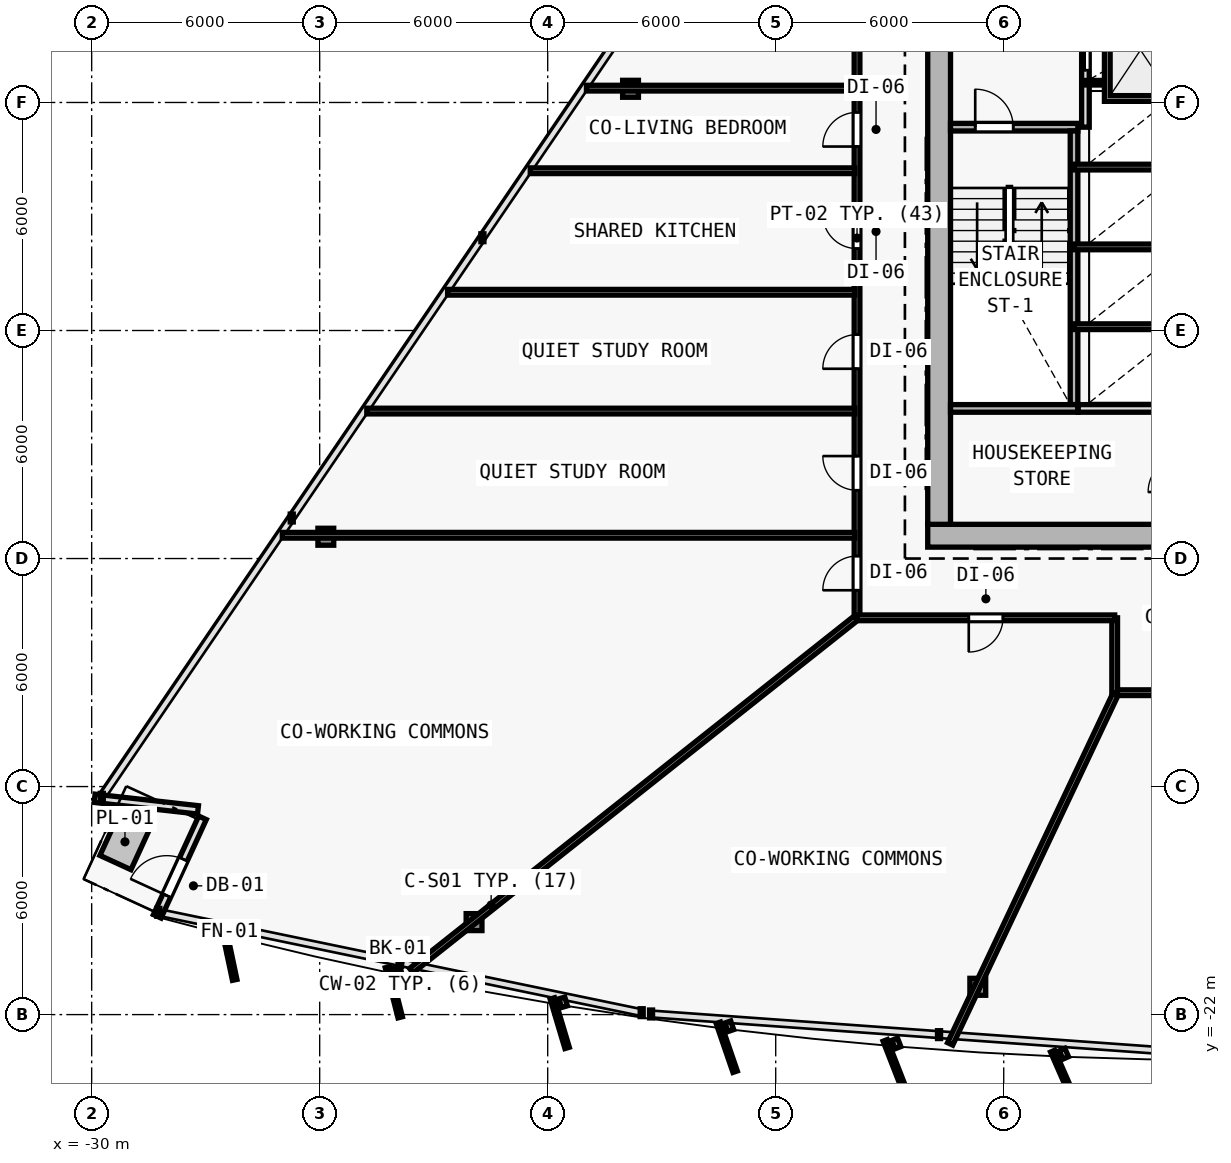
"""IFC4 building model, lengths in metres.
Left out: names, types, materials, properties, quantities, classifications, styles, units other than length and angle.
Written with IfcOpenShell. Run it as: python <this file> out.ifc"""

import sys

from ifc_helpers import new_model, si_unit, direction, frame, frame_2d, origin, origin_2d, place, context, subcontext, project, spatial, rectangle, i_section, extrude, element, fill, save


model = new_model("IFC4")
c1 = context("Model", 3, precision=1e-05, world=origin(), true_north=direction((0.0, 1.0)))
c2 = subcontext(c1, "Body", "Model", "MODEL_VIEW")
j1 = project(units=[si_unit("LENGTHUNIT", "METRE"), si_unit("PLANEANGLEUNIT", "RADIAN")], contexts=[c1])
p1 = place(None, origin())
s1 = spatial("IfcSite", under=j1, at=p1, CompositionType="ELEMENT")
p2 = place(p1, origin())
s2 = spatial("IfcBuilding", under=s1, at=p2, CompositionType="ELEMENT")
p3 = place(p2, frame((0.0, 0.0, 48.0)))
s3 = spatial("IfcBuildingStorey", under=s2, at=p3, CompositionType="ELEMENT", Elevation=48.0)
for number, where, z_axis, x_axis in (
    (1, (-7.7, -9.4, 0.0), (0.0, 0.0, 1.0), (1.0, 0.0, 0.0)),
    (2, (-7.7, 2.0, 0.0), (0.0, 0.0, 1.0), (1.0, 0.0, 0.0)),
):
    element("IfcColumn", number, at=place(p3, frame(where, z_axis=z_axis, x_axis=x_axis)), inside=s3, PredefinedType="COLUMN", context=c2, shape_type="SweptSolid", body=[
        extrude(i_section(OverallWidth=0.416, OverallDepth=0.446, WebThickness=0.025, FlangeThickness=0.04, FilletRadius=0.015, at=origin_2d()), origin(), (0.0, 0.0, 1.0), 3.6),
    ])
p4 = place(p3, frame((-19.938, -19.566, 0.006), z_axis=(0.020596339702, 0.033443561496, 0.99922836178), x_axis=(-0.851480003019, 0.52438707503, 0.0)))
e3 = element("IfcColumn", 3, at=p4, inside=s3, PredefinedType="COLUMN", context=c2, shape_type="SweptSolid", body=[
    extrude(i_section(OverallWidth=0.416, OverallDepth=0.446, WebThickness=0.025, FlangeThickness=0.04, FilletRadius=0.015, at=origin_2d()), origin(), (0.0, 0.0, 1.0), 3.592),
])
p5 = place(p3, frame((-6.682, -21.268, 0.006), z_axis=(0.006866324617, 0.035215407439, 0.999356157066), x_axis=(-0.981516643497, 0.191376797284, 0.0)))
e4 = element("IfcColumn", 4, at=p5, inside=s3, PredefinedType="COLUMN", context=c2, shape_type="SweptSolid", body=[
    extrude(i_section(OverallWidth=0.416, OverallDepth=0.446, WebThickness=0.025, FlangeThickness=0.04, FilletRadius=0.015, at=origin_2d()), origin(), (0.0, 0.0, 1.0), 3.591),
])
p6 = place(p3, frame((-15.82, 2.36, 0.006), z_axis=(0.017071567417, 0.009521989794, 0.999808928394), x_axis=(-0.487119351792, 0.873335409284, 0.0)))
e5 = element("IfcColumn", 5, at=p6, inside=s3, PredefinedType="COLUMN", context=c2, shape_type="SweptSolid", body=[
    extrude(i_section(OverallWidth=0.416, OverallDepth=0.446, WebThickness=0.025, FlangeThickness=0.04, FilletRadius=0.015, at=origin_2d()), origin(), (0.0, 0.0, 1.0), 3.59),
])
p7 = place(p3, frame((-23.838, -9.427, 0.006), z_axis=(0.025224163578, 0.021620711639, 0.999447990843), x_axis=(-0.650791373456, 0.759256602365, 0.0)))
e6 = element("IfcColumn", 6, at=p7, inside=s3, PredefinedType="COLUMN", context=c2, shape_type="SweptSolid", body=[
    extrude(i_section(OverallWidth=0.416, OverallDepth=0.446, WebThickness=0.025, FlangeThickness=0.04, FilletRadius=0.015, at=origin_2d()), origin(), (0.0, 0.0, 1.0), 3.591),
])
p8 = place(p3, frame((-27.202, -16.612, 0.0), z_axis=(0.0, 0.0, 1.0), x_axis=(-0.993822658088, 0.110979837223, 0.0)))
e7 = element("IfcWall", 7, at=p8, inside=s3, PredefinedType="SOLIDWALL", context=c2, shape_type="SweptSolid", body=[
    extrude(rectangle(XDim=2.737, YDim=0.22, at=frame_2d((1.368, 0.0))), origin(), (0.0, 0.0, 1.0), 3.35),
])
p9 = place(p3, frame((-28.274, -19.414, 0.0), z_axis=(0.0, 0.0, 1.0), x_axis=(0.417521186742, 0.908667188041, 0.0)))
e8 = element("IfcWall", 8, at=p9, inside=s3, PredefinedType="SOLIDWALL", context=c2, shape_type="SweptSolid", body=[
    extrude(rectangle(XDim=2.852, YDim=0.22, at=frame_2d((1.426, 0.0))), origin(), (0.0, 0.0, 1.0), 3.35),
])
p10 = place(p9, frame((0.601, 0.0, 0.0)))
e9 = element("IfcOpeningElement", 9, at=p10, cuts=e8, PredefinedType="OPENING", context=c2, shape_type="SweptSolid", body=[
    extrude(rectangle(XDim=1.05, YDim=2.15, at=frame_2d((0.525, 1.075))), frame((0.0, 0.12, 0.0), z_axis=(0.0, -1.0, 0.0), x_axis=(1.0, 0.0, 0.0)), (0.0, 0.0, 1.0), 0.24),
])
p11 = place(p3, frame((-8.0, -9.4, 0.0), z_axis=(0.0, 0.0, 1.0), x_axis=(1.0, 0.0, 0.0)))
e10 = element("IfcWall", 10, at=p11, inside=s3, PredefinedType="SHEAR", context=c2, shape_type="SweptSolid", body=[
    extrude(rectangle(XDim=16.0, YDim=0.6, at=frame_2d((8.0, 0.0))), origin(), (0.0, 0.0, 1.0), 3.35),
])
p12 = place(p11, frame((9.65, 0.0, 0.0)))
e11 = element("IfcOpeningElement", 11, at=p12, cuts=e10, PredefinedType="OPENING", context=c2, shape_type="SweptSolid", body=[
    extrude(rectangle(XDim=1.5, YDim=2.2, at=frame_2d((0.75, 1.1))), frame((0.0, 0.31, 0.0), z_axis=(0.0, -1.0, 0.0), x_axis=(1.0, 0.0, 0.0)), (0.0, 0.0, 1.0), 0.62),
])
p13 = place(p3, frame((-7.7, -9.1, 0.0), z_axis=(0.0, 0.0, 1.0), x_axis=(0.0, 1.0, 0.0)))
e12 = element("IfcWall", 12, at=p13, inside=s3, PredefinedType="SHEAR", context=c2, shape_type="SweptSolid", body=[
    extrude(rectangle(XDim=19.0, YDim=0.6, at=frame_2d((9.5, 0.0))), origin(), (0.0, 0.0, 1.0), 3.35),
])
p14 = place(p13, frame((12.65, 0.0, 0.0)))
e13 = element("IfcOpeningElement", 13, at=p14, cuts=e12, PredefinedType="OPENING", context=c2, shape_type="SweptSolid", body=[
    extrude(rectangle(XDim=1.1, YDim=2.15, at=frame_2d((0.55, 1.075))), frame((0.0, 0.31, 0.0), z_axis=(0.0, -1.0, 0.0), x_axis=(1.0, 0.0, 0.0)), (0.0, 0.0, 1.0), 0.62),
])
p15 = place(p3, frame((-7.4, 1.35, 0.0), z_axis=(0.0, 0.0, 1.0), x_axis=(1.0, 0.0, 0.0)))
e14 = element("IfcWall", 14, at=p15, inside=s3, PredefinedType="SOLIDWALL", context=c2, shape_type="SweptSolid", body=[
    extrude(rectangle(XDim=3.35, YDim=0.2, at=frame_2d((1.675, 0.0))), origin(), (0.0, 0.0, 1.0), 3.35),
])
p16 = place(p15, frame((0.65, 0.0, 0.0)))
e15 = element("IfcOpeningElement", 15, at=p16, cuts=e14, PredefinedType="OPENING", context=c2, shape_type="SweptSolid", body=[
    extrude(rectangle(XDim=1.0, YDim=2.15, at=frame_2d((0.5, 1.075))), frame((0.0, 0.11, 0.0), z_axis=(0.0, -1.0, 0.0), x_axis=(1.0, 0.0, 0.0)), (0.0, 0.0, 1.0), 0.22),
])
p17 = place(p3, frame((-4.15, -5.95, 0.0), z_axis=(0.0, 0.0, 1.0), x_axis=(0.0, 1.0, 0.0)))
e16 = element("IfcWall", 16, at=p17, inside=s3, PredefinedType="SOLIDWALL", context=c2, shape_type="SweptSolid", body=[
    extrude(rectangle(XDim=7.2, YDim=0.2, at=frame_2d((3.6, 0.0))), origin(), (0.0, 0.0, 1.0), 3.35),
])
p18 = place(p3, frame((-3.85, 1.35, 0.0), z_axis=(0.0, 0.0, 1.0), x_axis=(0.0, 1.0, 0.0)))
e17 = element("IfcWall", 17, at=p18, inside=s3, PredefinedType="SOLIDWALL", context=c2, shape_type="SweptSolid", body=[
    extrude(rectangle(XDim=8.545, YDim=0.2, at=frame_2d((4.272, 0.0))), origin(), (0.0, 0.0, 1.0), 3.35),
])
p19 = place(p18, frame((1.5, 0.0, 0.0)))
e18 = element("IfcOpeningElement", 18, at=p19, cuts=e17, PredefinedType="OPENING", context=c2, shape_type="SweptSolid", body=[
    extrude(rectangle(XDim=1.0, YDim=2.15, at=frame_2d((0.5, 1.075))), frame((0.0, 0.11, 0.0), z_axis=(0.0, -1.0, 0.0), x_axis=(1.0, 0.0, 0.0)), (0.0, 0.0, 1.0), 0.22),
])
p20 = place(p18, frame((3.18, 0.0, 0.0)))
e19 = element("IfcOpeningElement", 19, at=p20, cuts=e17, PredefinedType="OPENING", context=c2, shape_type="SweptSolid", body=[
    extrude(rectangle(XDim=1.0, YDim=2.15, at=frame_2d((0.5, 1.075))), frame((0.0, 0.11, 0.0), z_axis=(0.0, -1.0, 0.0), x_axis=(1.0, 0.0, 0.0)), (0.0, 0.0, 1.0), 0.22),
])
p21 = place(p3, frame((-3.85, 2.52, 0.0), z_axis=(0.0, 0.0, 1.0), x_axis=(1.0, 0.0, 0.0)))
e20 = element("IfcWall", 20, at=p21, inside=s3, PredefinedType="PARTITIONING", context=c2, shape_type="SweptSolid", body=[
    extrude(rectangle(XDim=2.9, YDim=0.12, at=frame_2d((1.45, 0.0))), origin(), (0.0, 0.0, 1.0), 3.35),
])
for number, where, z_axis, x_axis in (
    (21, (-4.15, -3.9, 0.0), (0.0, 0.0, 1.0), (1.0, 0.0, 0.0)),
    (22, (-4.15, -1.8, 0.0), (0.0, 0.0, 1.0), (1.0, 0.0, 0.0)),
    (23, (-4.15, 0.3, 0.0), (0.0, 0.0, 1.0), (1.0, 0.0, 0.0)),
):
    element("IfcWall", number, at=place(p3, frame(where, z_axis=z_axis, x_axis=x_axis)), inside=s3, PredefinedType="PARTITIONING", context=c2, shape_type="SweptSolid", body=[
        extrude(rectangle(XDim=2.9, YDim=0.15, at=frame_2d((1.45, 0.0))), origin(), (0.0, 0.0, 1.0), 3.35),
    ])
p22 = place(p3, frame((-7.4, -6.05, 0.0), z_axis=(0.0, 0.0, 1.0), x_axis=(1.0, 0.0, 0.0)))
e24 = element("IfcWall", 24, at=p22, inside=s3, PredefinedType="SOLIDWALL", context=c2, shape_type="SweptSolid", body=[
    extrude(rectangle(XDim=3.35, YDim=0.2, at=frame_2d((1.675, 0.0))), origin(), (0.0, 0.0, 1.0), 3.35),
])
p23 = place(p3, frame((-4.04, -6.05, 0.0), z_axis=(0.0, 0.0, 1.0), x_axis=(1.0, 0.0, 0.0)))
e25 = element("IfcWall", 25, at=p23, inside=s3, PredefinedType="SOLIDWALL", context=c2, shape_type="SweptSolid", body=[
    extrude(rectangle(XDim=2.79, YDim=0.2, at=frame_2d((1.395, 0.0))), origin(), (0.0, 0.0, 1.0), 3.35),
])
p24 = place(p3, frame((-9.86, -11.56, 0.0), z_axis=(0.0, 0.0, 1.0), x_axis=(0.0, 1.0, 0.0)))
e26 = element("IfcWall", 26, at=p24, inside=s3, PredefinedType="PARTITIONING", context=c2, shape_type="SweptSolid", body=[
    extrude(rectangle(XDim=19.986, YDim=0.15, at=frame_2d((9.993, 0.0))), origin(), (0.0, 0.0, 1.0), 2.609),
])
p25 = place(p24, frame((9.715, 0.0, 0.0)))
e27 = element("IfcOpeningElement", 27, at=p25, cuts=e26, PredefinedType="OPENING", context=c2, shape_type="SweptSolid", body=[
    extrude(rectangle(XDim=0.9, YDim=2.1, at=frame_2d((0.45, 1.05))), frame((0.0, 0.085, 0.0), z_axis=(0.0, -1.0, 0.0), x_axis=(1.0, 0.0, 0.0)), (0.0, 0.0, 1.0), 0.17),
])
p26 = place(p24, frame((6.553, 0.0, 0.0)))
e28 = element("IfcOpeningElement", 28, at=p26, cuts=e26, PredefinedType="OPENING", context=c2, shape_type="SweptSolid", body=[
    extrude(rectangle(XDim=0.9, YDim=2.1, at=frame_2d((0.45, 1.05))), frame((0.0, 0.085, 0.0), z_axis=(0.0, -1.0, 0.0), x_axis=(1.0, 0.0, 0.0)), (0.0, 0.0, 1.0), 0.17),
])
p27 = place(p24, frame((3.356, 0.0, 0.0)))
e29 = element("IfcOpeningElement", 29, at=p27, cuts=e26, PredefinedType="OPENING", context=c2, shape_type="SweptSolid", body=[
    extrude(rectangle(XDim=0.9, YDim=2.1, at=frame_2d((0.45, 1.05))), frame((0.0, 0.085, 0.0), z_axis=(0.0, -1.0, 0.0), x_axis=(1.0, 0.0, 0.0)), (0.0, 0.0, 1.0), 0.17),
])
p28 = place(p24, frame((0.725, 0.0, 0.0)))
e30 = element("IfcOpeningElement", 30, at=p28, cuts=e26, PredefinedType="OPENING", context=c2, shape_type="SweptSolid", body=[
    extrude(rectangle(XDim=0.9, YDim=2.1, at=frame_2d((0.45, 1.05))), frame((0.0, 0.085, 0.0), z_axis=(0.0, -1.0, 0.0), x_axis=(1.0, 0.0, 0.0)), (0.0, 0.0, 1.0), 0.17),
])
p29 = place(p24, frame((12.4, 0.0, 0.0)))
e31 = element("IfcOpeningElement", 31, at=p29, cuts=e26, PredefinedType="OPENING", context=c2, shape_type="SweptSolid", body=[
    extrude(rectangle(XDim=0.9, YDim=2.1, at=frame_2d((0.45, 1.05))), frame((0.0, 0.085, 0.0), z_axis=(0.0, -1.0, 0.0), x_axis=(1.0, 0.0, 0.0)), (0.0, 0.0, 1.0), 0.17),
])
p30 = place(p3, frame((3.08, -13.53, 0.0), z_axis=(0.0, 0.0, 1.0), x_axis=(-1.0, 0.0, 0.0)))
e32 = element("IfcWall", 32, at=p30, inside=s3, PredefinedType="PARTITIONING", context=c2, shape_type="SweptSolid", body=[
    extrude(rectangle(XDim=6.16, YDim=0.15, at=frame_2d((3.08, 0.0))), origin(), (0.0, 0.0, 1.0), 2.725),
])
p31 = place(p3, frame((-3.08, -13.53, 0.0), z_axis=(0.0, 0.0, 1.0), x_axis=(0.0, 1.0, 0.0)))
e33 = element("IfcWall", 33, at=p31, inside=s3, PredefinedType="PARTITIONING", context=c2, shape_type="SweptSolid", body=[
    extrude(rectangle(XDim=1.97, YDim=0.15, at=frame_2d((0.985, 0.0))), origin(), (0.0, 0.0, 1.0), 2.965),
])
p32 = place(p3, frame((-3.08, -11.56, 0.0), z_axis=(0.0, 0.0, 1.0), x_axis=(-1.0, 0.0, 0.0)))
e34 = element("IfcWall", 34, at=p32, inside=s3, PredefinedType="PARTITIONING", context=c2, shape_type="SweptSolid", body=[
    extrude(rectangle(XDim=6.78, YDim=0.15, at=frame_2d((3.39, 0.0))), origin(), (0.0, 0.0, 1.0), 2.725),
])
p33 = place(p32, frame((2.94, 0.0, 0.0)))
e35 = element("IfcOpeningElement", 35, at=p33, cuts=e34, PredefinedType="OPENING", context=c2, shape_type="SweptSolid", body=[
    extrude(rectangle(XDim=0.9, YDim=2.1, at=frame_2d((0.45, 1.05))), frame((0.0, 0.085, 0.0), z_axis=(0.0, -1.0, 0.0), x_axis=(1.0, 0.0, 0.0)), (0.0, 0.0, 1.0), 0.17),
])
p34 = place(p3, frame((-9.888, -11.569, 0.0), z_axis=(0.0, 0.0, 1.0), x_axis=(-0.78362091668, -0.621239292819, 0.0)))
e36 = element("IfcWall", 36, at=p34, inside=s3, PredefinedType="PARTITIONING", context=c2, shape_type="SweptSolid", body=[
    extrude(rectangle(XDim=14.931, YDim=0.15, at=frame_2d((7.466, 0.0))), origin(), (0.0, 0.0, 1.0), 2.725),
])
p35 = place(p3, frame((-3.061, -13.576, 0.0), z_axis=(0.0, 0.0, 1.0), x_axis=(-0.427557967945, -0.903987933574, 0.0)))
e37 = element("IfcWall", 37, at=p35, inside=s3, PredefinedType="PARTITIONING", context=c2, shape_type="SweptSolid", body=[
    extrude(rectangle(XDim=10.171, YDim=0.15, at=frame_2d((5.085, 0.0))), origin(), (0.0, 0.0, 1.0), 2.725),
])
p36 = place(p3, frame((-9.92, 2.377, 0.0), z_axis=(0.0, 0.0, 1.0), x_axis=(-1.0, 0.0, 0.0)))
e38 = element("IfcWall", 38, at=p36, inside=s3, PredefinedType="PARTITIONING", context=c2, shape_type="SweptSolid", body=[
    extrude(rectangle(XDim=7.06, YDim=0.15, at=frame_2d((3.53, 0.0))), origin(), (0.0, 0.0, 1.0), 2.725),
])
p37 = place(p3, frame((-9.92, -9.388, 0.0), z_axis=(0.0, 0.0, 1.0), x_axis=(-1.0, 0.0, 0.0)))
e39 = element("IfcWall", 39, at=p37, inside=s3, PredefinedType="PARTITIONING", context=c2, shape_type="SweptSolid", body=[
    extrude(rectangle(XDim=15.063, YDim=0.15, at=frame_2d((7.532, 0.0))), origin(), (0.0, 0.0, 1.0), 2.609),
])
p38 = place(p3, frame((-9.92, -2.993, 0.0), z_axis=(0.0, 0.0, 1.0), x_axis=(-1.0, 0.0, 0.0)))
e40 = element("IfcWall", 40, at=p38, inside=s3, PredefinedType="PARTITIONING", context=c2, shape_type="SweptSolid", body=[
    extrude(rectangle(XDim=10.713, YDim=0.15, at=frame_2d((5.357, 0.0))), origin(), (0.0, 0.0, 1.0), 2.735),
])
p39 = place(p3, frame((-9.92, 0.204, 0.0), z_axis=(0.0, 0.0, 1.0), x_axis=(-1.0, 0.0, 0.0)))
e41 = element("IfcWall", 41, at=p39, inside=s3, PredefinedType="PARTITIONING", context=c2, shape_type="SweptSolid", body=[
    extrude(rectangle(XDim=8.538, YDim=0.15, at=frame_2d((4.269, 0.0))), origin(), (0.0, 0.0, 1.0), 2.735),
])
p40 = place(p3, frame((-9.92, -6.12, 0.0), z_axis=(0.0, 0.0, 1.0), x_axis=(-1.0, 0.0, 0.0)))
e42 = element("IfcWall", 42, at=p40, inside=s3, PredefinedType="PARTITIONING", context=c2, shape_type="SweptSolid", body=[
    extrude(rectangle(XDim=12.84, YDim=0.15, at=frame_2d((6.42, 0.0))), origin(), (0.0, 0.0, 1.0), 2.735),
])
p41 = place(p10, origin())
e43 = element("IfcDoor", 43, at=p41, inside=s3, OperationType="SINGLE_SWING_LEFT", PredefinedType="DOOR", context=c2, shape_type="SweptSolid", body=[
    extrude(rectangle(XDim=1.05, YDim=2.15, at=frame_2d((0.525, 1.075))), frame((0.0, 0.025, 0.0), z_axis=(0.0, -1.0, 0.0), x_axis=(1.0, 0.0, 0.0)), (0.0, 0.0, 1.0), 0.05),
])
fill(e9, e43)
p42 = place(p16, origin())
e44 = element("IfcDoor", 44, at=p42, inside=s3, OperationType="SINGLE_SWING_LEFT", PredefinedType="DOOR", context=c2, shape_type="SweptSolid", body=[
    extrude(rectangle(XDim=1.0, YDim=2.15, at=frame_2d((0.5, 1.075))), frame((0.0, 0.025, 0.0), z_axis=(0.0, -1.0, 0.0), x_axis=(1.0, 0.0, 0.0)), (0.0, 0.0, 1.0), 0.05),
])
fill(e15, e44)
p43 = place(p19, origin())
e45 = element("IfcDoor", 45, at=p43, inside=s3, OperationType="DOUBLE_DOOR_SLIDING", PredefinedType="DOOR", context=c2, shape_type="SweptSolid", body=[
    extrude(rectangle(XDim=1.0, YDim=2.15, at=frame_2d((0.5, 1.075))), frame((0.0, 0.025, 0.0), z_axis=(0.0, -1.0, 0.0), x_axis=(1.0, 0.0, 0.0)), (0.0, 0.0, 1.0), 0.05),
])
fill(e18, e45)
p44 = place(p25, origin())
e46 = element("IfcDoor", 46, at=p44, inside=s3, OperationType="SINGLE_SWING_RIGHT", PredefinedType="DOOR", context=c2, shape_type="SweptSolid", body=[
    extrude(rectangle(XDim=0.9, YDim=2.1, at=frame_2d((0.45, 1.05))), frame((0.0, 0.025, 0.0), z_axis=(0.0, -1.0, 0.0), x_axis=(1.0, 0.0, 0.0)), (0.0, 0.0, 1.0), 0.05),
])
fill(e27, e46)
p45 = place(p26, origin())
e47 = element("IfcDoor", 47, at=p45, inside=s3, OperationType="SINGLE_SWING_LEFT", PredefinedType="DOOR", context=c2, shape_type="SweptSolid", body=[
    extrude(rectangle(XDim=0.9, YDim=2.1, at=frame_2d((0.45, 1.05))), frame((0.0, 0.025, 0.0), z_axis=(0.0, -1.0, 0.0), x_axis=(1.0, 0.0, 0.0)), (0.0, 0.0, 1.0), 0.05),
])
fill(e28, e47)
p46 = place(p27, origin())
e48 = element("IfcDoor", 48, at=p46, inside=s3, OperationType="SINGLE_SWING_RIGHT", PredefinedType="DOOR", context=c2, shape_type="SweptSolid", body=[
    extrude(rectangle(XDim=0.9, YDim=2.1, at=frame_2d((0.45, 1.05))), frame((0.0, 0.025, 0.0), z_axis=(0.0, -1.0, 0.0), x_axis=(1.0, 0.0, 0.0)), (0.0, 0.0, 1.0), 0.05),
])
fill(e29, e48)
p47 = place(p28, origin())
e49 = element("IfcDoor", 49, at=p47, inside=s3, OperationType="SINGLE_SWING_LEFT", PredefinedType="DOOR", context=c2, shape_type="SweptSolid", body=[
    extrude(rectangle(XDim=0.9, YDim=2.1, at=frame_2d((0.45, 1.05))), frame((0.0, 0.025, 0.0), z_axis=(0.0, -1.0, 0.0), x_axis=(1.0, 0.0, 0.0)), (0.0, 0.0, 1.0), 0.05),
])
fill(e30, e49)
p48 = place(p33, origin())
e50 = element("IfcDoor", 50, at=p48, inside=s3, OperationType="SINGLE_SWING_RIGHT", PredefinedType="DOOR", context=c2, shape_type="SweptSolid", body=[
    extrude(rectangle(XDim=0.9, YDim=2.1, at=frame_2d((0.45, 1.05))), frame((0.0, 0.025, 0.0), z_axis=(0.0, -1.0, 0.0), x_axis=(1.0, 0.0, 0.0)), (0.0, 0.0, 1.0), 0.05),
])
fill(e35, e50)
p49 = place(p29, origin())
e51 = element("IfcDoor", 51, at=p49, inside=s3, OperationType="SINGLE_SWING_LEFT", PredefinedType="DOOR", context=c2, shape_type="SweptSolid", body=[
    extrude(rectangle(XDim=0.9, YDim=2.1, at=frame_2d((0.45, 1.05))), frame((0.0, 0.025, 0.0), z_axis=(0.0, -1.0, 0.0), x_axis=(1.0, 0.0, 0.0)), (0.0, 0.0, 1.0), 0.05),
])
fill(e31, e51)
save(model, sys.argv[1])
